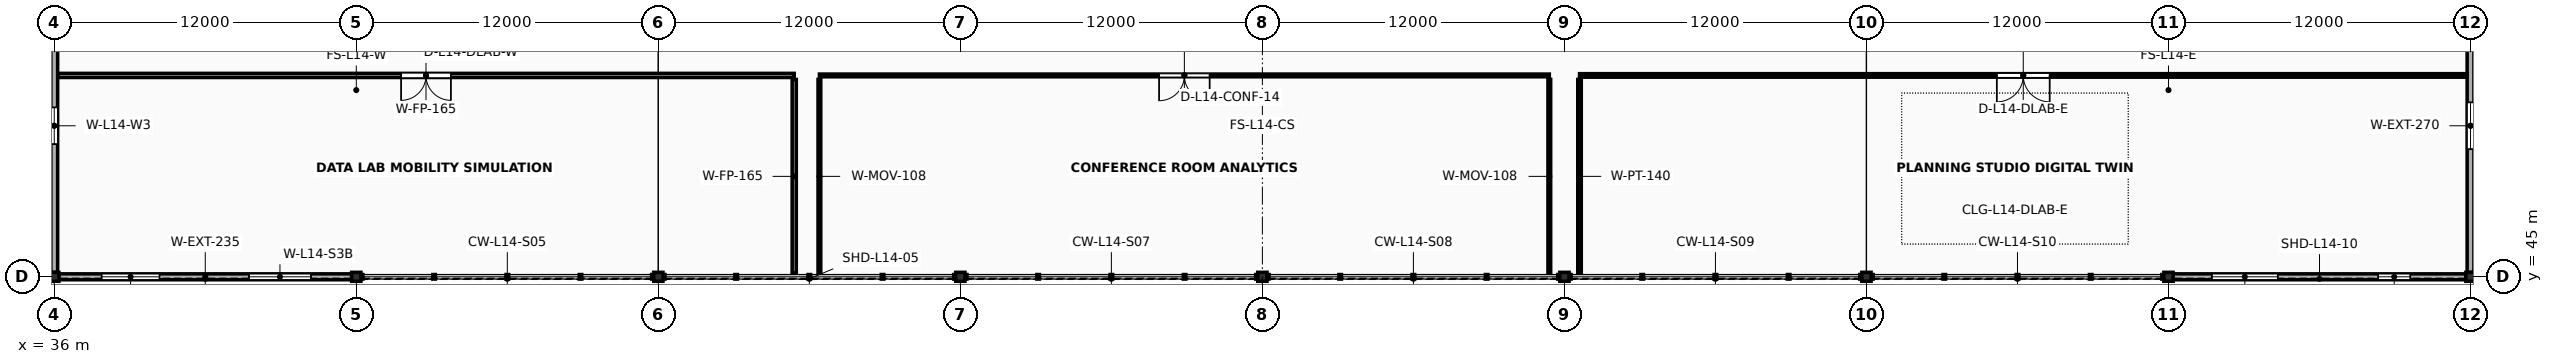
"""IFC4 building model, lengths in metres.
Left out: names, types, materials, properties, quantities, classifications, styles, units other than length and angle.
Written with IfcOpenShell. Run it as: python <this file> out.ifc"""

import sys

from ifc_helpers import new_model, si_unit, direction, frame, frame_2d, origin, origin_2d, place, context, subcontext, project, spatial, rectangle, i_section, extrude, element, fill, save


model = new_model("IFC4")
c1 = context("Model", 3, precision=1e-05, world=origin(), true_north=direction((0.0, 1.0)))
c2 = subcontext(c1, "Body", "Model", "MODEL_VIEW")
j1 = project(units=[si_unit("LENGTHUNIT", "METRE"), si_unit("PLANEANGLEUNIT", "RADIAN")], contexts=[c1])
p1 = place(None, origin())
s1 = spatial("IfcSite", under=j1, at=p1, CompositionType="ELEMENT")
p2 = place(p1, origin())
s2 = spatial("IfcBuilding", under=s1, at=p2, CompositionType="ELEMENT")
p3 = place(p2, frame((0.0, 0.0, 57.6)))
s3 = spatial("IfcBuildingStorey", under=s2, at=p3, CompositionType="ELEMENT", Elevation=57.6)
for number, where, z_axis, x_axis in (
    (1, (36.0, 45.0, 0.0), (0.0, 0.0, 1.0), (1.0, 0.0, 0.0)),
    (2, (48.0, 45.0, 0.0), (0.0, 0.0, 1.0), (1.0, 0.0, 0.0)),
    (3, (60.0, 45.0, 0.0), (0.0, 0.0, 1.0), (1.0, 0.0, 0.0)),
    (4, (72.0, 45.0, 0.0), (0.0, 0.0, 1.0), (1.0, 0.0, 0.0)),
    (5, (84.0, 45.0, 0.0), (0.0, 0.0, 1.0), (1.0, 0.0, 0.0)),
    (6, (96.0, 45.0, 0.0), (0.0, 0.0, 1.0), (1.0, 0.0, 0.0)),
    (7, (108.0, 45.0, 0.0), (0.0, 0.0, 1.0), (1.0, 0.0, 0.0)),
    (8, (120.0, 45.0, 0.0), (0.0, 0.0, 1.0), (1.0, 0.0, 0.0)),
    (9, (132.0, 45.0, 0.0), (0.0, 0.0, 1.0), (1.0, 0.0, 0.0)),
):
    element("IfcColumn", number, at=place(p3, frame(where, z_axis=z_axis, x_axis=x_axis)), inside=s3, PredefinedType="COLUMN", context=c2, shape_type="SweptSolid", body=[
        extrude(i_section(OverallWidth=0.369, OverallDepth=0.356, WebThickness=0.011, FlangeThickness=0.018, FilletRadius=0.018, at=origin_2d()), origin(), (0.0, 0.0, 1.0), 4.0),
    ])
p4 = place(p3, frame((36.183, 45.0, 0.0), z_axis=(0.0, 0.0, 1.0), x_axis=(1.0, 0.0, 0.0)))
e10 = element("IfcWall", 10, at=p4, inside=s3, PredefinedType="SOLIDWALL", context=c2, shape_type="SweptSolid", body=[
    extrude(rectangle(XDim=11.635, YDim=0.235, at=frame_2d((5.817, 0.0))), origin(), (0.0, 0.0, 1.0), 3.216),
])
p5 = place(p4, frame((1.7, 0.0, 0.78)))
e11 = element("IfcOpeningElement", 11, at=p5, cuts=e10, PredefinedType="OPENING", context=c2, shape_type="SweptSolid", body=[
    extrude(rectangle(XDim=2.3, YDim=1.58, at=frame_2d((1.15, 0.79))), frame((0.0, 0.133, 0.0), z_axis=(0.0, -1.0, 0.0), x_axis=(1.0, 0.0, 0.0)), (0.0, 0.0, 1.0), 0.265),
])
p6 = place(p4, frame((7.555, 0.0, 0.78)))
e12 = element("IfcOpeningElement", 12, at=p6, cuts=e10, PredefinedType="OPENING", context=c2, shape_type="SweptSolid", body=[
    extrude(rectangle(XDim=2.46, YDim=1.58, at=frame_2d((1.23, 0.79))), frame((0.0, 0.133, 0.0), z_axis=(0.0, -1.0, 0.0), x_axis=(1.0, 0.0, 0.0)), (0.0, 0.0, 1.0), 0.265),
])
p7 = place(p3, frame((120.183, 45.0, 0.0), z_axis=(0.0, 0.0, 1.0), x_axis=(1.0, 0.0, 0.0)))
e13 = element("IfcWall", 13, at=p7, inside=s3, PredefinedType="SOLIDWALL", context=c2, shape_type="SweptSolid", body=[
    extrude(rectangle(XDim=11.635, YDim=0.235, at=frame_2d((5.817, 0.0))), origin(), (0.0, 0.0, 1.0), 3.216),
])
p8 = place(p7, frame((1.54, 0.0, 0.78)))
e14 = element("IfcOpeningElement", 14, at=p8, cuts=e13, PredefinedType="OPENING", context=c2, shape_type="SweptSolid", body=[
    extrude(rectangle(XDim=2.62, YDim=1.58, at=frame_2d((1.31, 0.79))), frame((0.0, 0.133, 0.0), z_axis=(0.0, -1.0, 0.0), x_axis=(1.0, 0.0, 0.0)), (0.0, 0.0, 1.0), 0.265),
])
p9 = place(p7, frame((8.145, 0.0, 0.78)))
e15 = element("IfcOpeningElement", 15, at=p9, cuts=e13, PredefinedType="OPENING", context=c2, shape_type="SweptSolid", body=[
    extrude(rectangle(XDim=1.28, YDim=1.74, at=frame_2d((0.64, 0.87))), frame((0.0, 0.133, 0.0), z_axis=(0.0, -1.0, 0.0), x_axis=(1.0, 0.0, 0.0)), (0.0, 0.0, 1.0), 0.265),
])
p10 = place(p3, frame((36.0, 45.176, 0.0), z_axis=(0.0, 0.0, 1.0), x_axis=(0.0, 1.0, 0.0)))
e16 = element("IfcWall", 16, at=p10, inside=s3, PredefinedType="SOLIDWALL", context=c2, shape_type="SweptSolid", body=[
    extrude(rectangle(XDim=11.648, YDim=0.27, at=frame_2d((5.824, 0.0))), origin(), (0.0, 0.0, 1.0), 3.216),
])
p11 = place(p10, frame((5.094, 0.0, 0.78)))
e17 = element("IfcOpeningElement", 17, at=p11, cuts=e16, PredefinedType="OPENING", context=c2, shape_type="SweptSolid", body=[
    extrude(rectangle(XDim=1.46, YDim=1.74, at=frame_2d((0.73, 0.87))), frame((0.0, 0.15, 0.0), z_axis=(0.0, -1.0, 0.0), x_axis=(1.0, 0.0, 0.0)), (0.0, 0.0, 1.0), 0.3),
])
p12 = place(p3, frame((132.0, 45.176, 0.0), z_axis=(0.0, 0.0, 1.0), x_axis=(0.0, 1.0, 0.0)))
e18 = element("IfcWall", 18, at=p12, inside=s3, PredefinedType="SOLIDWALL", context=c2, shape_type="SweptSolid", body=[
    extrude(rectangle(XDim=11.648, YDim=0.27, at=frame_2d((5.824, 0.0))), origin(), (0.0, 0.0, 1.0), 3.216),
])
p13 = place(p12, frame((4.894, 0.0, 0.78)))
e19 = element("IfcOpeningElement", 19, at=p13, cuts=e18, PredefinedType="OPENING", context=c2, shape_type="SweptSolid", body=[
    extrude(rectangle(XDim=1.86, YDim=1.74, at=frame_2d((0.93, 0.87))), frame((0.0, 0.15, 0.0), z_axis=(0.0, -1.0, 0.0), x_axis=(1.0, 0.0, 0.0)), (0.0, 0.0, 1.0), 0.3),
])
p14 = place(p3, frame((36.14, 53.0, 0.0), z_axis=(0.0, 0.0, 1.0), x_axis=(1.0, 0.0, 0.0)))
e20 = element("IfcWall", 20, at=p14, inside=s3, PredefinedType="PARTITIONING", context=c2, shape_type="SweptSolid", body=[
    extrude(rectangle(XDim=29.26, YDim=0.165, at=frame_2d((14.63, 0.0))), origin(), (0.0, 0.0, 1.0), 2.88),
])
p15 = place(p14, frame((13.64, 0.0, 0.0)))
e21 = element("IfcOpeningElement", 21, at=p15, cuts=e20, PredefinedType="OPENING", context=c2, shape_type="SweptSolid", body=[
    extrude(rectangle(XDim=1.98, YDim=2.4, at=frame_2d((0.99, 1.2))), frame((0.0, 0.097, 0.0), z_axis=(0.0, -1.0, 0.0), x_axis=(1.0, 0.0, 0.0)), (0.0, 0.0, 1.0), 0.195),
])
p16 = place(p3, frame((65.4, 45.14, 0.0), z_axis=(0.0, 0.0, 1.0), x_axis=(0.0, 1.0, 0.0)))
e22 = element("IfcWall", 22, at=p16, inside=s3, PredefinedType="PARTITIONING", context=c2, shape_type="SweptSolid", body=[
    extrude(rectangle(XDim=7.7, YDim=0.165, at=frame_2d((3.85, 0.0))), origin(), (0.0, 0.0, 1.0), 2.88),
])
p17 = place(p3, frame((66.4, 53.0, 0.0), z_axis=(0.0, 0.0, 1.0), x_axis=(1.0, 0.0, 0.0)))
e23 = element("IfcWall", 23, at=p17, inside=s3, PredefinedType="MOVABLE", context=c2, shape_type="SweptSolid", body=[
    extrude(rectangle(XDim=29.0, YDim=0.108, at=frame_2d((14.5, 0.0))), origin(), (0.0, 0.0, 1.0), 2.88),
])
p18 = place(p17, frame((13.495, 0.0, 0.0)))
e24 = element("IfcOpeningElement", 24, at=p18, cuts=e23, PredefinedType="OPENING", context=c2, shape_type="SweptSolid", body=[
    extrude(rectangle(XDim=2.01, YDim=2.45, at=frame_2d((1.005, 1.225))), frame((0.0, 0.069, 0.0), z_axis=(0.0, -1.0, 0.0), x_axis=(1.0, 0.0, 0.0)), (0.0, 0.0, 1.0), 0.138),
])
for number, where, z_axis, x_axis in (
    (25, (66.4, 45.14, 0.0), (0.0, 0.0, 1.0), (0.0, 1.0, 0.0)),
    (26, (95.4, 45.14, 0.0), (0.0, 0.0, 1.0), (0.0, 1.0, 0.0)),
):
    element("IfcWall", number, at=place(p3, frame(where, z_axis=z_axis, x_axis=x_axis)), inside=s3, PredefinedType="MOVABLE", context=c2, shape_type="SweptSolid", body=[
        extrude(rectangle(XDim=7.7, YDim=0.108, at=frame_2d((3.85, 0.0))), origin(), (0.0, 0.0, 1.0), 2.88),
    ])
p19 = place(p3, frame((96.6, 53.0, 0.0), z_axis=(0.0, 0.0, 1.0), x_axis=(1.0, 0.0, 0.0)))
e27 = element("IfcWall", 27, at=p19, inside=s3, PredefinedType="PARTITIONING", context=c2, shape_type="SweptSolid", body=[
    extrude(rectangle(XDim=35.26, YDim=0.14, at=frame_2d((17.63, 0.0))), origin(), (0.0, 0.0, 1.0), 2.88),
])
p20 = place(p19, frame((16.58, 0.0, 0.0)))
e28 = element("IfcOpeningElement", 28, at=p20, cuts=e27, PredefinedType="OPENING", context=c2, shape_type="SweptSolid", body=[
    extrude(rectangle(XDim=2.1, YDim=2.47, at=frame_2d((1.05, 1.235))), frame((0.0, 0.085, 0.0), z_axis=(0.0, -1.0, 0.0), x_axis=(1.0, 0.0, 0.0)), (0.0, 0.0, 1.0), 0.17),
])
p21 = place(p3, frame((96.6, 45.14, 0.0), z_axis=(0.0, 0.0, 1.0), x_axis=(0.0, 1.0, 0.0)))
e29 = element("IfcWall", 29, at=p21, inside=s3, PredefinedType="PARTITIONING", context=c2, shape_type="SweptSolid", body=[
    extrude(rectangle(XDim=7.7, YDim=0.14, at=frame_2d((3.85, 0.0))), origin(), (0.0, 0.0, 1.0), 2.88),
])
p22 = place(p5, origin())
e30 = element("IfcWindow", 30, at=p22, inside=s3, PartitioningType="DOUBLE_PANEL_VERTICAL", PredefinedType="WINDOW", context=c2, shape_type="SweptSolid", body=[
    extrude(rectangle(XDim=2.3, YDim=1.58, at=frame_2d((1.15, 0.79))), frame((0.0, 0.03, 0.0), z_axis=(0.0, -1.0, 0.0), x_axis=(1.0, 0.0, 0.0)), (0.0, 0.0, 1.0), 0.06),
])
fill(e11, e30)
p23 = place(p6, origin())
e31 = element("IfcWindow", 31, at=p23, inside=s3, PartitioningType="DOUBLE_PANEL_VERTICAL", PredefinedType="WINDOW", context=c2, shape_type="SweptSolid", body=[
    extrude(rectangle(XDim=2.46, YDim=1.58, at=frame_2d((1.23, 0.79))), frame((0.0, 0.03, 0.0), z_axis=(0.0, -1.0, 0.0), x_axis=(1.0, 0.0, 0.0)), (0.0, 0.0, 1.0), 0.06),
])
fill(e12, e31)
p24 = place(p8, origin())
e32 = element("IfcWindow", 32, at=p24, inside=s3, PartitioningType="DOUBLE_PANEL_VERTICAL", PredefinedType="WINDOW", context=c2, shape_type="SweptSolid", body=[
    extrude(rectangle(XDim=2.62, YDim=1.58, at=frame_2d((1.31, 0.79))), frame((0.0, 0.03, 0.0), z_axis=(0.0, -1.0, 0.0), x_axis=(1.0, 0.0, 0.0)), (0.0, 0.0, 1.0), 0.06),
])
fill(e14, e32)
p25 = place(p9, origin())
e33 = element("IfcWindow", 33, at=p25, inside=s3, PartitioningType="SINGLE_PANEL", PredefinedType="WINDOW", context=c2, shape_type="SweptSolid", body=[
    extrude(rectangle(XDim=1.28, YDim=1.74, at=frame_2d((0.64, 0.87))), frame((0.0, 0.03, 0.0), z_axis=(0.0, -1.0, 0.0), x_axis=(1.0, 0.0, 0.0)), (0.0, 0.0, 1.0), 0.06),
])
fill(e15, e33)
p26 = place(p11, origin())
e34 = element("IfcWindow", 34, at=p26, inside=s3, PartitioningType="SINGLE_PANEL", PredefinedType="WINDOW", context=c2, shape_type="SweptSolid", body=[
    extrude(rectangle(XDim=1.46, YDim=1.74, at=frame_2d((0.73, 0.87))), frame((0.0, 0.03, 0.0), z_axis=(0.0, -1.0, 0.0), x_axis=(1.0, 0.0, 0.0)), (0.0, 0.0, 1.0), 0.06),
])
fill(e17, e34)
p27 = place(p13, origin())
e35 = element("IfcWindow", 35, at=p27, inside=s3, PartitioningType="DOUBLE_PANEL_VERTICAL", PredefinedType="WINDOW", context=c2, shape_type="SweptSolid", body=[
    extrude(rectangle(XDim=1.86, YDim=1.74, at=frame_2d((0.93, 0.87))), frame((0.0, 0.03, 0.0), z_axis=(0.0, -1.0, 0.0), x_axis=(1.0, 0.0, 0.0)), (0.0, 0.0, 1.0), 0.06),
])
fill(e19, e35)
p28 = place(p15, origin())
e36 = element("IfcDoor", 36, at=p28, inside=s3, OperationType="DOUBLE_DOOR_SINGLE_SWING", PredefinedType="DOOR", context=c2, shape_type="SweptSolid", body=[
    extrude(rectangle(XDim=1.98, YDim=2.4, at=frame_2d((0.99, 1.2))), frame((0.0, 0.025, 0.0), z_axis=(0.0, -1.0, 0.0), x_axis=(1.0, 0.0, 0.0)), (0.0, 0.0, 1.0), 0.05),
])
fill(e21, e36)
p29 = place(p18, origin())
e37 = element("IfcDoor", 37, at=p29, inside=s3, OperationType="DOUBLE_DOOR_SINGLE_SWING", PredefinedType="DOOR", context=c2, shape_type="SweptSolid", body=[
    extrude(rectangle(XDim=2.01, YDim=2.45, at=frame_2d((1.005, 1.225))), frame((0.0, 0.025, 0.0), z_axis=(0.0, -1.0, 0.0), x_axis=(1.0, 0.0, 0.0)), (0.0, 0.0, 1.0), 0.05),
])
fill(e24, e37)
p30 = place(p20, origin())
e38 = element("IfcDoor", 38, at=p30, inside=s3, OperationType="DOUBLE_DOOR_SINGLE_SWING", PredefinedType="DOOR", context=c2, shape_type="SweptSolid", body=[
    extrude(rectangle(XDim=2.1, YDim=2.47, at=frame_2d((1.05, 1.235))), frame((0.0, 0.025, 0.0), z_axis=(0.0, -1.0, 0.0), x_axis=(1.0, 0.0, 0.0)), (0.0, 0.0, 1.0), 0.05),
])
fill(e28, e38)
save(model, sys.argv[1])
